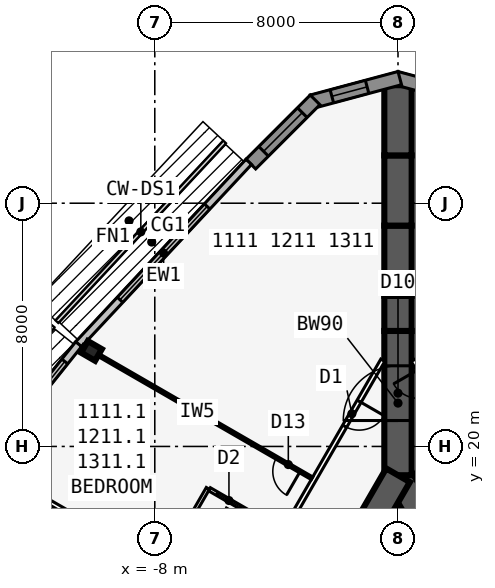
"""IFC4 building model, lengths in metres.
Left out: names, types, materials, properties, quantities, classifications, styles, units other than length and angle.
Written with IfcOpenShell. Run it as: python <this file> out.ifc"""

import sys

from ifc_helpers import new_model, si_unit, direction, frame, frame_2d, origin, origin_2d, place, context, subcontext, project, spatial, polyline, rectangle, i_section, outline, extrude, element, fill, save


model = new_model("IFC4")
c1 = context("Model", 3, precision=1e-05, world=origin(), true_north=direction((0.0, 1.0)))
c2 = subcontext(c1, "Body", "Model", "MODEL_VIEW")
j1 = project(units=[si_unit("LENGTHUNIT", "METRE"), si_unit("PLANEANGLEUNIT", "RADIAN")], contexts=[c1])
p1 = place(None, origin())
s1 = spatial("IfcSite", under=j1, at=p1, CompositionType="ELEMENT")
p2 = place(p1, origin())
s2 = spatial("IfcBuilding", under=s1, at=p2, CompositionType="ELEMENT")
p3 = place(p2, frame((0.0, 0.0, 48.9)))
s3 = spatial("IfcBuildingStorey", under=s2, at=p3, CompositionType="ELEMENT", Elevation=48.9)
p4 = place(p3, frame((16.5, -9.526, 0.0), z_axis=(0.0, 0.0, 1.0), x_axis=(-0.499999749417, 0.866025548458, 0.0)))
e1 = element("IfcWall", 1, at=p4, inside=s3, PredefinedType="SHEAR", context=c2, shape_type="SweptSolid", body=[
    extrude(rectangle(XDim=33.0, YDim=0.9, at=frame_2d((16.5, 0.0))), origin(), (0.0, 0.0, 1.0), 3.4),
])
p5 = place(p4, frame((14.15, 0.0, 0.0)))
e2 = element("IfcOpeningElement", 2, at=p5, cuts=e1, PredefinedType="OPENING", context=c2, shape_type="SweptSolid", body=[
    extrude(rectangle(XDim=1.8, YDim=2.13, at=frame_2d((0.9, 1.065))), frame((0.0, 0.46, 0.0), z_axis=(0.0, -1.0, 0.0), x_axis=(1.0, 0.0, 0.0)), (0.0, 0.0, 1.0), 0.92),
])
p6 = place(p4, frame((12.6, 0.0, 0.0)))
e3 = element("IfcOpeningElement", 3, at=p6, cuts=e1, PredefinedType="OPENING", context=c2, shape_type="SweptSolid", body=[
    extrude(rectangle(XDim=1.0, YDim=2.13, at=frame_2d((0.5, 1.065))), frame((0.0, 0.46, 0.0), z_axis=(0.0, -1.0, 0.0), x_axis=(1.0, 0.0, 0.0)), (0.0, 0.0, 1.0), 0.92),
])
p7 = place(p3, frame((0.0, 19.052, 0.0), z_axis=(0.0, 0.0, 1.0), x_axis=(-0.499999749417, -0.866025548458, 0.0)))
e4 = element("IfcWall", 4, at=p7, inside=s3, PredefinedType="SHEAR", context=c2, shape_type="SweptSolid", body=[
    extrude(rectangle(XDim=33.0, YDim=0.9, at=frame_2d((16.5, 0.0))), origin(), (0.0, 0.0, 1.0), 3.4),
])
p8 = place(p7, frame((14.15, 0.0, 0.0)))
e5 = element("IfcOpeningElement", 5, at=p8, cuts=e4, PredefinedType="OPENING", context=c2, shape_type="SweptSolid", body=[
    extrude(rectangle(XDim=1.8, YDim=2.13, at=frame_2d((0.9, 1.065))), frame((0.0, 0.46, 0.0), z_axis=(0.0, -1.0, 0.0), x_axis=(1.0, 0.0, 0.0)), (0.0, 0.0, 1.0), 0.92),
])
p9 = place(p7, frame((12.6, 0.0, 0.0)))
e6 = element("IfcOpeningElement", 6, at=p9, cuts=e4, PredefinedType="OPENING", context=c2, shape_type="SweptSolid", body=[
    extrude(rectangle(XDim=1.0, YDim=2.13, at=frame_2d((0.5, 1.065))), frame((0.0, 0.46, 0.0), z_axis=(0.0, -1.0, 0.0), x_axis=(1.0, 0.0, 0.0)), (0.0, 0.0, 1.0), 0.92),
])
p10 = place(p3, frame((0.0, 19.052, 0.0), z_axis=(0.0, 0.0, 1.0), x_axis=(0.0, 1.0, 0.0)))
e7 = element("IfcWall", 7, at=p10, inside=s3, PredefinedType="SHEAR", context=c2, shape_type="SweptSolid", body=[
    extrude(rectangle(XDim=4.746, YDim=0.9, at=frame_2d((2.373, 0.0))), origin(), (0.0, 0.0, 1.0), 3.4),
])
p11 = place(p10, frame((1.8, 0.0, 0.0)))
e8 = element("IfcOpeningElement", 8, at=p11, cuts=e7, PredefinedType="OPENING", context=c2, shape_type="SweptSolid", body=[
    extrude(rectangle(XDim=1.8, YDim=2.13, at=frame_2d((0.9, 1.065))), frame((0.0, 0.46, 0.0), z_axis=(0.0, -1.0, 0.0), x_axis=(1.0, 0.0, 0.0)), (0.0, 0.0, 1.0), 0.92),
])
p12 = place(p3, frame((0.0, 23.799, 0.0), z_axis=(0.0, 0.0, 1.0), x_axis=(0.0, 1.0, 0.0)))
e9 = element("IfcWall", 9, at=p12, inside=s3, PredefinedType="SHEAR", context=c2, shape_type="SweptSolid", body=[
    extrude(rectangle(XDim=1.155, YDim=0.9, at=frame_2d((0.577, 0.0))), origin(), (0.0, 0.0, 1.0), 3.4),
])
p13 = place(p3, frame((0.0, 24.953, 0.0), z_axis=(0.0, 0.0, 1.0), x_axis=(0.0, 1.0, 0.0)))
e10 = element("IfcWall", 10, at=p13, inside=s3, PredefinedType="SHEAR", context=c2, shape_type="SweptSolid", body=[
    extrude(rectangle(XDim=2.309, YDim=0.9, at=frame_2d((1.155, 0.0))), origin(), (0.0, 0.0, 1.0), 3.4),
])
p14 = place(p3, frame((0.0, 27.263, 0.0), z_axis=(0.0, 0.0, 1.0), x_axis=(0.0, 1.0, 0.0)))
e11 = element("IfcWall", 11, at=p14, inside=s3, PredefinedType="SHEAR", context=c2, shape_type="SweptSolid", body=[
    extrude(rectangle(XDim=2.31, YDim=0.9, at=frame_2d((1.155, 0.0))), origin(), (0.0, 0.0, 1.0), 3.4),
])
p15 = place(p3, frame((0.0, 29.572, 0.0), z_axis=(0.0, 0.0, 1.0), x_axis=(0.0, 1.0, 0.0)))
e12 = element("IfcWall", 12, at=p15, inside=s3, PredefinedType="SHEAR", context=c2, shape_type="SweptSolid", body=[
    extrude(rectangle(XDim=2.309, YDim=0.9, at=frame_2d((1.155, 0.0))), origin(), (0.0, 0.0, 1.0), 3.4),
])
p16 = place(p3, frame((-10.083, 23.142, 0.0), z_axis=(0.0, 0.0, 1.0), x_axis=(-0.5, -0.866025403784, 0.0)))
e13 = element("IfcColumn", 13, at=p16, inside=s3, PredefinedType="COLUMN", context=c2, shape_type="SweptSolid", body=[
    extrude(i_section(OverallWidth=0.442, OverallDepth=0.531, WebThickness=0.066, FlangeThickness=0.106, at=origin_2d()), origin(), (0.0, 0.0, 1.0), 3.4),
])
p17 = place(p3, frame((2.829, 31.341, 0.0), z_axis=(0.0, 0.0, 1.0), x_axis=(-0.965930548995, 0.258801419081, 0.0)))
e14 = element("IfcWall", 14, at=p17, inside=s3, PredefinedType="SOLIDWALL", context=c2, shape_type="SweptSolid", body=[
    extrude(outline(polyline([(2.989, 0.225), (2.929, 0.225), (2.438, 0.093), (2.402, 0.225), (0.0, 0.225), (0.0, -0.225), (2.989, -0.225), (2.989, 0.225)])), origin(), (0.0, 0.0, 1.0), 3.235),
])
p18 = place(p17, frame((0.676, 0.0, 0.45)))
e15 = element("IfcOpeningElement", 15, at=p18, cuts=e14, PredefinedType="OPENING", context=c2, shape_type="SweptSolid", body=[
    extrude(rectangle(XDim=1.2, YDim=2.4, at=frame_2d((0.6, 1.2))), frame((0.0, 0.235, 0.0), z_axis=(0.0, -1.0, 0.0), x_axis=(1.0, 0.0, 0.0)), (0.0, 0.0, 1.0), 0.47),
])
p19 = place(p3, frame((0.058, 32.114, 0.0), z_axis=(0.0, 0.0, 1.0), x_axis=(-0.965930548995, -0.258801419081, 0.0)))
e16 = element("IfcWall", 16, at=p19, inside=s3, PredefinedType="SOLIDWALL", context=c2, shape_type="SweptSolid", body=[
    extrude(outline(polyline([(2.989, 0.225), (0.586, 0.225), (0.551, 0.093), (0.059, 0.225), (0.0, 0.225), (0.0, -0.225), (2.989, -0.225), (2.989, 0.225)])), origin(), (0.0, 0.0, 1.0), 3.235),
])
p20 = place(p19, frame((1.113, 0.0, 0.45)))
e17 = element("IfcOpeningElement", 17, at=p20, cuts=e16, PredefinedType="OPENING", context=c2, shape_type="SweptSolid", body=[
    extrude(rectangle(XDim=1.2, YDim=2.4, at=frame_2d((0.6, 1.2))), frame((0.0, 0.235, 0.0), z_axis=(0.0, -1.0, 0.0), x_axis=(1.0, 0.0, 0.0)), (0.0, 0.0, 1.0), 0.47),
])
p21 = place(p3, frame((-2.728, 31.399, 0.0), z_axis=(0.0, 0.0, 1.0), x_axis=(-0.707106781187, -0.707106781187, 0.0)))
e18 = element("IfcWall", 18, at=p21, inside=s3, PredefinedType="SOLIDWALL", context=c2, shape_type="SweptSolid", body=[
    extrude(rectangle(XDim=2.988, YDim=0.45, at=frame_2d((1.494, 0.0))), origin(), (0.0, 0.0, 1.0), 3.235),
])
p22 = place(p21, frame((0.594, 0.0, 0.45)))
e19 = element("IfcOpeningElement", 19, at=p22, cuts=e18, PredefinedType="OPENING", context=c2, shape_type="SweptSolid", body=[
    extrude(rectangle(XDim=1.8, YDim=2.4, at=frame_2d((0.9, 1.2))), frame((0.0, 0.235, 0.0), z_axis=(0.0, -1.0, 0.0), x_axis=(1.0, 0.0, 0.0)), (0.0, 0.0, 1.0), 0.47),
])
p23 = place(p3, frame((-4.909, 29.36, 0.0), z_axis=(0.0, 0.0, 1.0), x_axis=(-0.682289646561, -0.731081964075, 0.0)))
e20 = element("IfcWall", 20, at=p23, inside=s3, PredefinedType="STANDARD", context=c2, shape_type="SweptSolid", body=[
    extrude(rectangle(XDim=8.211, YDim=0.25, at=frame_2d((4.105, 0.0))), origin(), (0.0, 0.0, 1.0), 3.235),
])
p24 = place(p23, frame((2.006, 0.0, 0.45)))
e21 = element("IfcOpeningElement", 21, at=p24, cuts=e20, PredefinedType="OPENING", context=c2, shape_type="SweptSolid", body=[
    extrude(rectangle(XDim=4.2, YDim=2.4, at=frame_2d((2.1, 1.2))), frame((0.0, 0.135, 0.0), z_axis=(0.0, -1.0, 0.0), x_axis=(1.0, 0.0, 0.0)), (0.0, 0.0, 1.0), 0.27),
])
p25 = place(p3, frame((-10.505, 23.364, 0.0), z_axis=(0.0, 0.0, 1.0), x_axis=(-0.624594965756, -0.780948864364, 0.0)))
e22 = element("IfcWall", 22, at=p25, inside=s3, PredefinedType="STANDARD", context=c2, shape_type="SweptSolid", body=[
    extrude(rectangle(XDim=5.058, YDim=0.25, at=frame_2d((2.529, 0.0))), origin(), (0.0, 0.0, 1.0), 3.235),
])
p26 = place(p25, frame((0.729, 0.0, 0.45)))
e23 = element("IfcOpeningElement", 23, at=p26, cuts=e22, PredefinedType="OPENING", context=c2, shape_type="SweptSolid", body=[
    extrude(rectangle(XDim=3.6, YDim=2.4, at=frame_2d((1.8, 1.2))), frame((0.0, 0.135, 0.0), z_axis=(0.0, -1.0, 0.0), x_axis=(1.0, 0.0, 0.0)), (0.0, 0.0, 1.0), 0.27),
])
p27 = place(p3, frame((20.027, -10.985, 0.0), z_axis=(0.0, 0.0, 1.0), x_axis=(-0.500001677587, 0.866024435227, 0.0)))
e24 = element("IfcWall", 24, at=p27, inside=s3, PredefinedType="PARTITIONING", context=c2, shape_type="SweptSolid", body=[
    extrude(rectangle(XDim=39.054, YDim=0.15, at=frame_2d((19.527, 0.0))), origin(), (0.0, 0.0, 1.0), 3.235),
])
p28 = place(p27, frame((1.558, 0.0, 0.0)))
e25 = element("IfcOpeningElement", 25, at=p28, cuts=e24, PredefinedType="OPENING", context=c2, shape_type="SweptSolid", body=[
    extrude(rectangle(XDim=0.95, YDim=2.13, at=frame_2d((0.475, 1.065))), frame((0.0, 0.085, 0.0), z_axis=(0.0, -1.0, 0.0), x_axis=(1.0, 0.0, 0.0)), (0.0, 0.0, 1.0), 0.17),
])
p29 = place(p27, frame((12.152, 0.0, 0.0)))
e26 = element("IfcOpeningElement", 26, at=p29, cuts=e24, PredefinedType="OPENING", context=c2, shape_type="SweptSolid", body=[
    extrude(rectangle(XDim=0.95, YDim=2.13, at=frame_2d((0.475, 1.065))), frame((0.0, 0.085, 0.0), z_axis=(0.0, -1.0, 0.0), x_axis=(1.0, 0.0, 0.0)), (0.0, 0.0, 1.0), 0.17),
])
p30 = place(p27, frame((17.152, 0.0, 0.0)))
e27 = element("IfcOpeningElement", 27, at=p30, cuts=e24, PredefinedType="OPENING", context=c2, shape_type="SweptSolid", body=[
    extrude(rectangle(XDim=0.95, YDim=2.13, at=frame_2d((0.475, 1.065))), frame((0.0, 0.085, 0.0), z_axis=(0.0, -1.0, 0.0), x_axis=(1.0, 0.0, 0.0)), (0.0, 0.0, 1.0), 0.17),
])
p31 = place(p27, frame((21.552, 0.0, 0.0)))
e28 = element("IfcOpeningElement", 28, at=p31, cuts=e24, PredefinedType="OPENING", context=c2, shape_type="SweptSolid", body=[
    extrude(rectangle(XDim=0.95, YDim=2.13, at=frame_2d((0.475, 1.065))), frame((0.0, 0.085, 0.0), z_axis=(0.0, -1.0, 0.0), x_axis=(1.0, 0.0, 0.0)), (0.0, 0.0, 1.0), 0.17),
])
p32 = place(p27, frame((32.152, 0.0, 0.0)))
e29 = element("IfcOpeningElement", 29, at=p32, cuts=e24, PredefinedType="OPENING", context=c2, shape_type="SweptSolid", body=[
    extrude(rectangle(XDim=0.95, YDim=2.13, at=frame_2d((0.475, 1.065))), frame((0.0, 0.085, 0.0), z_axis=(0.0, -1.0, 0.0), x_axis=(1.0, 0.0, 0.0)), (0.0, 0.0, 1.0), 0.17),
])
p33 = place(p27, frame((37.752, 0.0, 0.0)))
e30 = element("IfcOpeningElement", 30, at=p33, cuts=e24, PredefinedType="OPENING", context=c2, shape_type="SweptSolid", body=[
    extrude(rectangle(XDim=0.95, YDim=2.13, at=frame_2d((0.475, 1.065))), frame((0.0, 0.085, 0.0), z_axis=(0.0, -1.0, 0.0), x_axis=(1.0, 0.0, 0.0)), (0.0, 0.0, 1.0), 0.17),
])
p34 = place(p3, frame((-0.5, 22.836, 0.0), z_axis=(0.0, 0.0, 1.0), x_axis=(-0.500001677587, -0.866024435227, 0.0)))
e31 = element("IfcWall", 31, at=p34, inside=s3, PredefinedType="PARTITIONING", context=c2, shape_type="SweptSolid", body=[
    extrude(rectangle(XDim=39.054, YDim=0.15, at=frame_2d((19.527, 0.0))), origin(), (0.0, 0.0, 1.0), 3.235),
])
p35 = place(p34, frame((1.558, 0.0, 0.0)))
e32 = element("IfcOpeningElement", 32, at=p35, cuts=e31, PredefinedType="OPENING", context=c2, shape_type="SweptSolid", body=[
    extrude(rectangle(XDim=0.95, YDim=2.13, at=frame_2d((0.475, 1.065))), frame((0.0, 0.085, 0.0), z_axis=(0.0, -1.0, 0.0), x_axis=(1.0, 0.0, 0.0)), (0.0, 0.0, 1.0), 0.17),
])
p36 = place(p34, frame((12.752, 0.0, 0.0)))
e33 = element("IfcOpeningElement", 33, at=p36, cuts=e31, PredefinedType="OPENING", context=c2, shape_type="SweptSolid", body=[
    extrude(rectangle(XDim=0.95, YDim=2.13, at=frame_2d((0.475, 1.065))), frame((0.0, 0.085, 0.0), z_axis=(0.0, -1.0, 0.0), x_axis=(1.0, 0.0, 0.0)), (0.0, 0.0, 1.0), 0.17),
])
p37 = place(p34, frame((17.152, 0.0, 0.0)))
e34 = element("IfcOpeningElement", 34, at=p37, cuts=e31, PredefinedType="OPENING", context=c2, shape_type="SweptSolid", body=[
    extrude(rectangle(XDim=0.95, YDim=2.13, at=frame_2d((0.475, 1.065))), frame((0.0, 0.085, 0.0), z_axis=(0.0, -1.0, 0.0), x_axis=(1.0, 0.0, 0.0)), (0.0, 0.0, 1.0), 0.17),
])
p38 = place(p34, frame((22.152, 0.0, 0.0)))
e35 = element("IfcOpeningElement", 35, at=p38, cuts=e31, PredefinedType="OPENING", context=c2, shape_type="SweptSolid", body=[
    extrude(rectangle(XDim=0.95, YDim=2.13, at=frame_2d((0.475, 1.065))), frame((0.0, 0.085, 0.0), z_axis=(0.0, -1.0, 0.0), x_axis=(1.0, 0.0, 0.0)), (0.0, 0.0, 1.0), 0.17),
])
p39 = place(p34, frame((27.152, 0.0, 0.0)))
e36 = element("IfcOpeningElement", 36, at=p39, cuts=e31, PredefinedType="OPENING", context=c2, shape_type="SweptSolid", body=[
    extrude(rectangle(XDim=0.95, YDim=2.13, at=frame_2d((0.475, 1.065))), frame((0.0, 0.085, 0.0), z_axis=(0.0, -1.0, 0.0), x_axis=(1.0, 0.0, 0.0)), (0.0, 0.0, 1.0), 0.17),
])
p40 = place(p34, frame((36.546, 0.0, 0.0)))
e37 = element("IfcOpeningElement", 37, at=p40, cuts=e31, PredefinedType="OPENING", context=c2, shape_type="SweptSolid", body=[
    extrude(rectangle(XDim=0.95, YDim=2.13, at=frame_2d((0.475, 1.065))), frame((0.0, 0.085, 0.0), z_axis=(0.0, -1.0, 0.0), x_axis=(1.0, 0.0, 0.0)), (0.0, 0.0, 1.0), 0.17),
])
p41 = place(p3, frame((-2.829, 18.954, 0.0), z_axis=(0.0, 0.0, 1.0), x_axis=(-0.866020536561, 0.500008430184, 0.0)))
e38 = element("IfcWall", 38, at=p41, inside=s3, PredefinedType="PARTITIONING", context=c2, shape_type="SweptSolid", body=[
    extrude(rectangle(XDim=8.72, YDim=0.1, at=frame_2d((4.36, 0.0))), origin(), (0.0, 0.0, 1.0), 2.389),
])
p42 = place(p41, frame((0.45, 0.0, 0.0)))
e39 = element("IfcOpeningElement", 39, at=p42, cuts=e38, PredefinedType="OPENING", context=c2, shape_type="SweptSolid", body=[
    extrude(rectangle(XDim=0.9, YDim=2.13, at=frame_2d((0.45, 1.065))), frame((0.0, 0.06, 0.0), z_axis=(0.0, -1.0, 0.0), x_axis=(1.0, 0.0, 0.0)), (0.0, 0.0, 1.0), 0.12),
])
p43 = place(p3, frame((-5.329, 14.623, 0.0), z_axis=(0.0, 0.0, 1.0), x_axis=(-0.866018409083, 0.500012114982, 0.0)))
e40 = element("IfcWall", 40, at=p43, inside=s3, PredefinedType="PARTITIONING", context=c2, shape_type="SweptSolid", body=[
    extrude(rectangle(XDim=9.485, YDim=0.15, at=frame_2d((4.742, 0.0))), origin(), (0.0, 0.0, 1.0), 2.389),
])
p44 = place(p3, frame((-6.253, 18.622, 0.0), z_axis=(0.0, 0.0, 1.0), x_axis=(-0.499990139034, -0.866031096941, 0.0)))
e41 = element("IfcWall", 41, at=p44, inside=s3, PredefinedType="PLUMBINGWALL", context=c2, shape_type="SweptSolid", body=[
    extrude(rectangle(XDim=3.0, YDim=0.12, at=frame_2d((1.5, 0.0))), origin(), (0.0, 0.0, 1.0), 3.235),
])
p45 = place(p3, frame((-3.829, 17.221, 0.0), z_axis=(0.0, 0.0, 1.0), x_axis=(-0.865997131366, 0.500048966069, 0.0)))
e42 = element("IfcWall", 42, at=p45, inside=s3, PredefinedType="PLUMBINGWALL", context=c2, shape_type="SweptSolid", body=[
    extrude(rectangle(XDim=2.74, YDim=0.12, at=frame_2d((1.37, 0.0))), origin(), (0.0, 0.0, 1.0), 3.235),
])
p46 = place(p45, frame((1.55, 0.0, 0.0)))
e43 = element("IfcOpeningElement", 43, at=p46, cuts=e42, PredefinedType="OPENING", context=c2, shape_type="SweptSolid", body=[
    extrude(rectangle(XDim=0.9, YDim=2.13, at=frame_2d((0.45, 1.065))), frame((0.0, 0.07, 0.0), z_axis=(0.0, -1.0, 0.0), x_axis=(1.0, 0.0, 0.0)), (0.0, 0.0, 1.0), 0.14),
])
p47 = place(p20, origin())
e44 = element("IfcWindow", 44, at=p47, inside=s3, PartitioningType="SINGLE_PANEL", PredefinedType="WINDOW", context=c2, shape_type="SweptSolid", body=[
    extrude(rectangle(XDim=1.2, YDim=2.4, at=frame_2d((0.6, 1.2))), frame((0.0, 0.03, 0.0), z_axis=(0.0, -1.0, 0.0), x_axis=(1.0, 0.0, 0.0)), (0.0, 0.0, 1.0), 0.06),
])
fill(e17, e44)
p48 = place(p22, origin())
e45 = element("IfcWindow", 45, at=p48, inside=s3, PartitioningType="SINGLE_PANEL", PredefinedType="WINDOW", context=c2, shape_type="SweptSolid", body=[
    extrude(rectangle(XDim=1.8, YDim=2.4, at=frame_2d((0.9, 1.2))), frame((0.0, 0.03, 0.0), z_axis=(0.0, -1.0, 0.0), x_axis=(1.0, 0.0, 0.0)), (0.0, 0.0, 1.0), 0.06),
])
fill(e19, e45)
p49 = place(p24, origin())
e46 = element("IfcWindow", 46, at=p49, inside=s3, PartitioningType="SINGLE_PANEL", PredefinedType="WINDOW", context=c2, shape_type="SweptSolid", body=[
    extrude(rectangle(XDim=4.2, YDim=2.4, at=frame_2d((2.1, 1.2))), frame((0.0, 0.03, 0.0), z_axis=(0.0, -1.0, 0.0), x_axis=(1.0, 0.0, 0.0)), (0.0, 0.0, 1.0), 0.06),
])
fill(e21, e46)
p50 = place(p26, origin())
e47 = element("IfcWindow", 47, at=p50, inside=s3, PartitioningType="SINGLE_PANEL", PredefinedType="WINDOW", context=c2, shape_type="SweptSolid", body=[
    extrude(rectangle(XDim=3.6, YDim=2.4, at=frame_2d((1.8, 1.2))), frame((0.0, 0.03, 0.0), z_axis=(0.0, -1.0, 0.0), x_axis=(1.0, 0.0, 0.0)), (0.0, 0.0, 1.0), 0.06),
])
fill(e23, e47)
p51 = place(p42, origin())
e48 = element("IfcDoor", 48, at=p51, inside=s3, OperationType="SINGLE_SWING_LEFT", PredefinedType="DOOR", context=c2, shape_type="SweptSolid", body=[
    extrude(rectangle(XDim=0.9, YDim=2.13, at=frame_2d((0.45, 1.065))), frame((0.0, 0.025, 0.0), z_axis=(0.0, -1.0, 0.0), x_axis=(1.0, 0.0, 0.0)), (0.0, 0.0, 1.0), 0.05),
])
fill(e39, e48)
p52 = place(p35, origin())
e49 = element("IfcDoor", 49, at=p52, inside=s3, OperationType="SINGLE_SWING_LEFT", PredefinedType="DOOR", context=c2, shape_type="SweptSolid", body=[
    extrude(rectangle(XDim=0.95, YDim=2.13, at=frame_2d((0.475, 1.065))), frame((0.0, 0.025, 0.0), z_axis=(0.0, -1.0, 0.0), x_axis=(1.0, 0.0, 0.0)), (0.0, 0.0, 1.0), 0.05),
])
fill(e32, e49)
p53 = place(p46, origin())
e50 = element("IfcDoor", 50, at=p53, inside=s3, OperationType="SLIDING_TO_LEFT", PredefinedType="DOOR", context=c2, shape_type="SweptSolid", body=[
    extrude(rectangle(XDim=0.9, YDim=2.13, at=frame_2d((0.45, 1.065))), frame((0.0, 0.025, 0.0), z_axis=(0.0, -1.0, 0.0), x_axis=(1.0, 0.0, 0.0)), (0.0, 0.0, 1.0), 0.05),
])
fill(e43, e50)
p54 = place(p11, origin())
e51 = element("IfcDoor", 51, at=p54, inside=s3, OperationType="DOUBLE_DOOR_DOUBLE_SWING", PredefinedType="DOOR", context=c2, shape_type="SweptSolid", body=[
    extrude(rectangle(XDim=1.8, YDim=2.13, at=frame_2d((0.9, 1.065))), frame((0.0, 0.025, 0.0), z_axis=(0.0, -1.0, 0.0), x_axis=(1.0, 0.0, 0.0)), (0.0, 0.0, 1.0), 0.05),
])
fill(e8, e51)
save(model, sys.argv[1])
